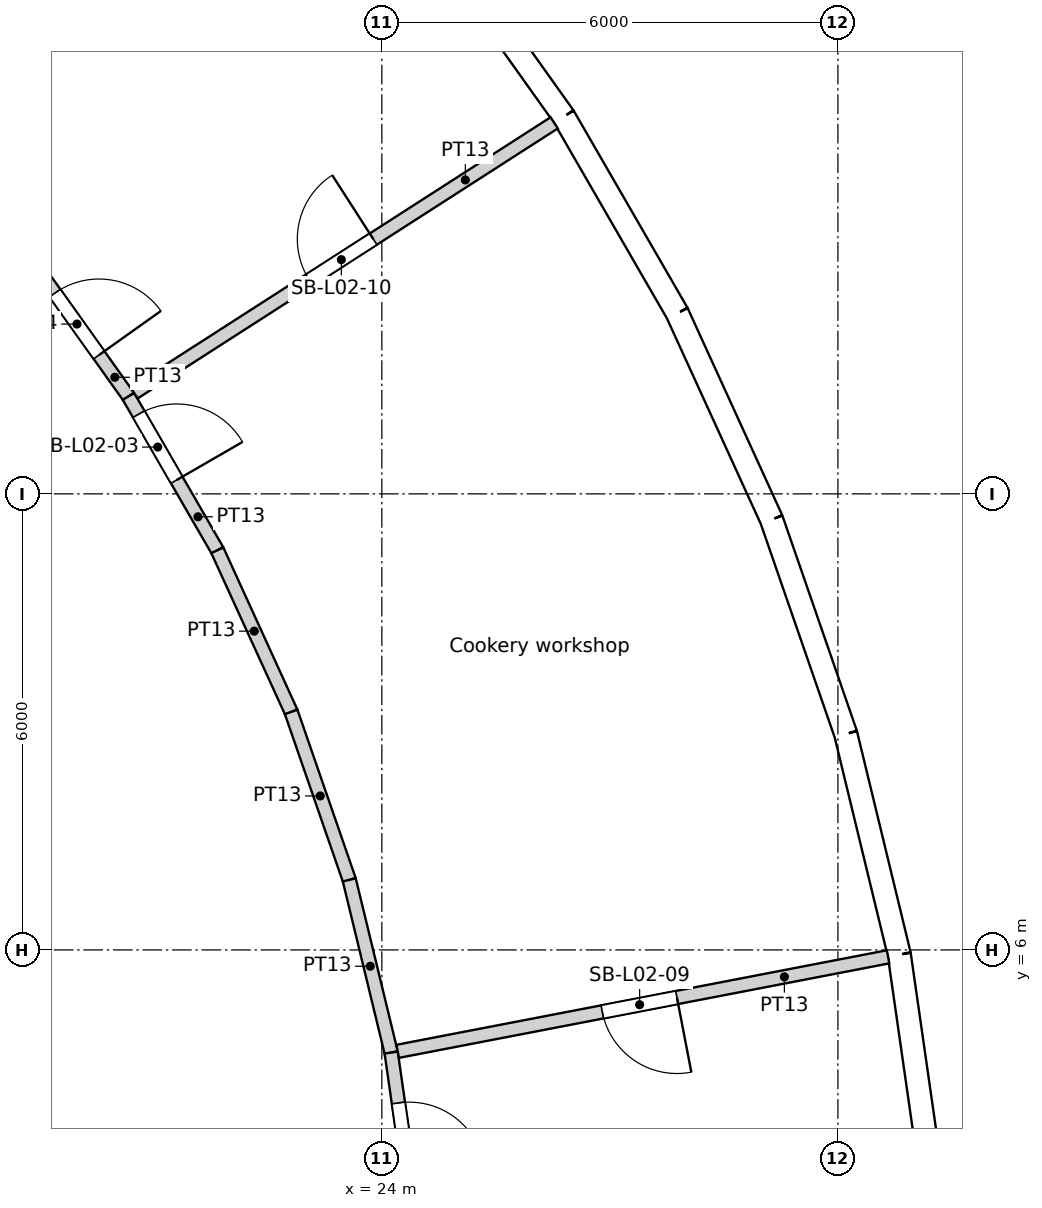
"""IFC4 building model, lengths in metres.
Left out: names, types, materials, properties, quantities, classifications, styles, units other than length and angle.
Written with IfcOpenShell. Run it as: python <this file> out.ifc"""

import sys

from ifc_helpers import new_model, si_unit, direction, frame, frame_2d, origin, origin_2d, place, context, subcontext, project, spatial, rectangle, circle, extrude, element, fill, save


model = new_model("IFC4")
c1 = context("Model", 3, precision=1e-05, world=origin(), true_north=direction((0.0, 1.0)))
c2 = subcontext(c1, "Body", "Model", "MODEL_VIEW")
j1 = project(units=[si_unit("LENGTHUNIT", "METRE"), si_unit("PLANEANGLEUNIT", "RADIAN")], contexts=[c1])
p1 = place(None, origin())
s1 = spatial("IfcSite", under=j1, at=p1, CompositionType="ELEMENT")
p2 = place(p1, origin())
s2 = spatial("IfcBuilding", under=s1, at=p2, CompositionType="ELEMENT")
p3 = place(p2, frame((0.0, 0.0, 13.8)))
s3 = spatial("IfcBuildingStorey", under=s2, at=p3, CompositionType="ELEMENT", Elevation=13.8)
for number, where, z_axis, x_axis in (
    (1, (29.728, 5.729, 0.0), (0.0, 0.0, 1.0), (1.0, 0.0, 0.0)),
    (2, (28.106, 11.252, 0.0), (0.0, 0.0, 1.0), (1.0, 0.0, 0.0)),
    (3, (25.469, 16.368, 0.0), (0.0, 0.0, 1.0), (1.0, 0.0, 0.0)),
):
    element("IfcColumn", number, at=place(p3, frame(where, z_axis=z_axis, x_axis=x_axis)), inside=s3, PredefinedType="COLUMN", context=c2, shape_type="SweptSolid", body=[
        extrude(circle(Radius=0.7, at=origin_2d()), origin(), (0.0, 0.0, 1.0), 4.8),
    ])
for number, where, z_axis, x_axis in (
    (4, (23.886, 5.661, 0.0), (0.0, 0.0, 1.0), (1.0, 0.0, 0.0)),
    (5, (21.937, 11.017, 0.0), (0.0, 0.0, 1.0), (1.0, 0.0, 0.0)),
):
    element("IfcColumn", number, at=place(p3, frame(where, z_axis=z_axis, x_axis=x_axis)), inside=s3, PredefinedType="COLUMN", context=c2, shape_type="SweptSolid", body=[
        extrude(circle(Radius=0.75, at=origin_2d()), origin(), (0.0, 0.0, 1.0), 4.8),
    ])
p4 = place(p3, frame((31.232, 2.982, 0.0), z_axis=(0.0, 0.0, 1.0), x_axis=(-0.142360001917, 0.989814947278, 0.0)))
e6 = element("IfcWall", 6, at=p4, inside=s3, PredefinedType="SOLIDWALL", context=c2, shape_type="SweptSolid", body=[
    extrude(rectangle(XDim=2.986, YDim=0.3, at=frame_2d((1.493, 0.0))), origin(), (0.0, 0.0, 1.0), 4.35),
])
p5 = place(p4, frame((1.493, 0.0, 2.0)))
e7 = element("IfcOpeningElement", 7, at=p5, cuts=e6, PredefinedType="OPENING", context=c2, shape_type="SweptSolid", body=[
    extrude(circle(Radius=1.2, at=origin_2d()), frame((0.0, 0.16, 0.0), z_axis=(0.0, -1.0, 0.0), x_axis=(1.0, 0.0, 0.0)), (0.0, 0.0, 1.0), 0.32),
])
p6 = place(p3, frame((30.807, 5.938, 0.0), z_axis=(0.0, 0.0, 1.0), x_axis=(-0.235756834479, 0.971812078026, 0.0)))
e8 = element("IfcWall", 8, at=p6, inside=s3, PredefinedType="SOLIDWALL", context=c2, shape_type="SweptSolid", body=[
    extrude(rectangle(XDim=2.986, YDim=0.3, at=frame_2d((1.493, 0.0))), origin(), (0.0, 0.0, 1.0), 4.35),
])
p7 = place(p6, frame((1.493, 0.0, 2.0)))
e9 = element("IfcOpeningElement", 9, at=p7, cuts=e8, PredefinedType="OPENING", context=c2, shape_type="SweptSolid", body=[
    extrude(circle(Radius=1.2, at=origin_2d()), frame((0.0, 0.16, 0.0), z_axis=(0.0, -1.0, 0.0), x_axis=(1.0, 0.0, 0.0)), (0.0, 0.0, 1.0), 0.32),
])
p8 = place(p3, frame((30.104, 8.839, 0.0), z_axis=(0.0, 0.0, 1.0), x_axis=(-0.327074054052, 0.944998710669, 0.0)))
e10 = element("IfcWall", 10, at=p8, inside=s3, PredefinedType="SOLIDWALL", context=c2, shape_type="SweptSolid", body=[
    extrude(rectangle(XDim=2.986, YDim=0.3, at=frame_2d((1.493, 0.0))), origin(), (0.0, 0.0, 1.0), 4.35),
])
p9 = place(p8, frame((1.493, 0.0, 2.0)))
e11 = element("IfcOpeningElement", 11, at=p9, cuts=e10, PredefinedType="OPENING", context=c2, shape_type="SweptSolid", body=[
    extrude(circle(Radius=1.2, at=origin_2d()), frame((0.0, 0.16, 0.0), z_axis=(0.0, -1.0, 0.0), x_axis=(1.0, 0.0, 0.0)), (0.0, 0.0, 1.0), 0.32),
])
p10 = place(p3, frame((29.127, 11.661, 0.0), z_axis=(0.0, 0.0, 1.0), x_axis=(-0.415373250944, 0.909651066289, 0.0)))
e12 = element("IfcWall", 12, at=p10, inside=s3, PredefinedType="SOLIDWALL", context=c2, shape_type="SweptSolid", body=[
    extrude(rectangle(XDim=2.986, YDim=0.3, at=frame_2d((1.493, 0.0))), origin(), (0.0, 0.0, 1.0), 4.35),
])
p11 = place(p10, frame((1.493, 0.0, 2.0)))
e13 = element("IfcOpeningElement", 13, at=p11, cuts=e12, PredefinedType="OPENING", context=c2, shape_type="SweptSolid", body=[
    extrude(circle(Radius=1.2, at=origin_2d()), frame((0.0, 0.16, 0.0), z_axis=(0.0, -1.0, 0.0), x_axis=(1.0, 0.0, 0.0)), (0.0, 0.0, 1.0), 0.32),
])
p12 = place(p3, frame((27.887, 14.377, 0.0), z_axis=(0.0, 0.0, 1.0), x_axis=(-0.500017373705, 0.866015372839, 0.0)))
e14 = element("IfcWall", 14, at=p12, inside=s3, PredefinedType="SOLIDWALL", context=c2, shape_type="SweptSolid", body=[
    extrude(rectangle(XDim=2.986, YDim=0.3, at=frame_2d((1.493, 0.0))), origin(), (0.0, 0.0, 1.0), 4.35),
])
p13 = place(p12, frame((1.493, 0.0, 2.0)))
e15 = element("IfcOpeningElement", 15, at=p13, cuts=e14, PredefinedType="OPENING", context=c2, shape_type="SweptSolid", body=[
    extrude(circle(Radius=1.2, at=origin_2d()), frame((0.0, 0.16, 0.0), z_axis=(0.0, -1.0, 0.0), x_axis=(1.0, 0.0, 0.0)), (0.0, 0.0, 1.0), 0.32),
])
p14 = place(p3, frame((26.394, 16.962, 0.0), z_axis=(0.0, 0.0, 1.0), x_axis=(-0.580100533892, 0.814544885551, 0.0)))
e16 = element("IfcWall", 16, at=p14, inside=s3, PredefinedType="SOLIDWALL", context=c2, shape_type="SweptSolid", body=[
    extrude(rectangle(XDim=2.986, YDim=0.3, at=frame_2d((1.493, 0.0))), origin(), (0.0, 0.0, 1.0), 4.35),
])
p15 = place(p14, frame((1.493, 0.0, 2.0)))
e17 = element("IfcOpeningElement", 17, at=p15, cuts=e16, PredefinedType="OPENING", context=c2, shape_type="SweptSolid", body=[
    extrude(circle(Radius=1.2, at=origin_2d()), frame((0.0, 0.16, 0.0), z_axis=(0.0, -1.0, 0.0), x_axis=(1.0, 0.0, 0.0)), (0.0, 0.0, 1.0), 0.32),
])
p16 = place(p3, frame((19.311, 15.186, 0.0), z_axis=(0.0, 0.0, 1.0), x_axis=(0.580032319147, -0.814593462252, 0.0)))
e18 = element("IfcWall", 18, at=p16, inside=s3, PredefinedType="PARTITIONING", context=c2, shape_type="SweptSolid", body=[
    extrude(rectangle(XDim=2.338, YDim=0.175, at=frame_2d((1.169, 0.0))), origin(), (0.0, 0.0, 1.0), 3.75),
])
p17 = place(p16, frame((0.669, 0.0, 0.0)))
e19 = element("IfcOpeningElement", 19, at=p17, cuts=e18, PredefinedType="OPENING", context=c2, shape_type="SweptSolid", body=[
    extrude(rectangle(XDim=1.0, YDim=2.1, at=frame_2d((0.5, 1.05))), frame((0.0, 0.087, 0.0), z_axis=(0.0, -1.0, 0.0), x_axis=(1.0, 0.0, 0.0)), (0.0, 0.0, 1.0), 0.175),
])
p18 = place(p3, frame((20.667, 13.282, 0.0), z_axis=(0.0, 0.0, 1.0), x_axis=(0.500002679963, -0.866023856502, 0.0)))
e20 = element("IfcWall", 20, at=p18, inside=s3, PredefinedType="PARTITIONING", context=c2, shape_type="SweptSolid", body=[
    extrude(rectangle(XDim=2.338, YDim=0.175, at=frame_2d((1.169, 0.0))), origin(), (0.0, 0.0, 1.0), 3.75),
])
p19 = place(p18, frame((0.269, 0.0, 0.0)))
e21 = element("IfcOpeningElement", 21, at=p19, cuts=e20, PredefinedType="OPENING", context=c2, shape_type="SweptSolid", body=[
    extrude(rectangle(XDim=1.0, YDim=2.1, at=frame_2d((0.5, 1.05))), frame((0.0, 0.087, 0.0), z_axis=(0.0, -1.0, 0.0), x_axis=(1.0, 0.0, 0.0)), (0.0, 0.0, 1.0), 0.175),
])
p20 = place(p3, frame((17.717, 16.893, 0.0), z_axis=(0.0, 0.0, 1.0), x_axis=(0.723737544967, 0.690075333573, 0.0)))
e22 = element("IfcWall", 22, at=p20, inside=s3, PredefinedType="PARTITIONING", context=c2, shape_type="SweptSolid", body=[
    extrude(rectangle(XDim=6.745, YDim=0.175, at=frame_2d((3.373, 0.0))), origin(), (0.0, 0.0, 1.0), 3.75),
])
p21 = place(p20, frame((3.592, 0.0, 0.0)))
e23 = element("IfcOpeningElement", 23, at=p21, cuts=e22, PredefinedType="OPENING", context=c2, shape_type="SweptSolid", body=[
    extrude(rectangle(XDim=1.0, YDim=2.1, at=frame_2d((0.5, 1.05))), frame((0.0, 0.087, 0.0), z_axis=(0.0, -1.0, 0.0), x_axis=(1.0, 0.0, 0.0)), (0.0, 0.0, 1.0), 0.175),
])
p22 = place(p3, frame((22.807, 9.131, 0.0), z_axis=(0.0, 0.0, 1.0), x_axis=(-0.415438886862, 0.909621092149, 0.0)))
e24 = element("IfcWall", 24, at=p22, inside=s3, PredefinedType="PARTITIONING", context=c2, shape_type="SweptSolid", body=[
    extrude(rectangle(XDim=2.338, YDim=0.175, at=frame_2d((1.169, 0.0))), origin(), (0.0, 0.0, 1.0), 3.75),
])
p23 = place(p3, frame((23.572, 6.921, 0.0), z_axis=(0.0, 0.0, 1.0), x_axis=(-0.327046007052, 0.945008417566, 0.0)))
e25 = element("IfcWall", 25, at=p23, inside=s3, PredefinedType="PARTITIONING", context=c2, shape_type="SweptSolid", body=[
    extrude(rectangle(XDim=2.338, YDim=0.175, at=frame_2d((1.169, 0.0))), origin(), (0.0, 0.0, 1.0), 3.75),
])
p24 = place(p3, frame((24.123, 4.649, 0.0), z_axis=(0.0, 0.0, 1.0), x_axis=(-0.235821214509, 0.971796457489, 0.0)))
e26 = element("IfcWall", 26, at=p24, inside=s3, PredefinedType="PARTITIONING", context=c2, shape_type="SweptSolid", body=[
    extrude(rectangle(XDim=2.338, YDim=0.175, at=frame_2d((1.169, 0.0))), origin(), (0.0, 0.0, 1.0), 3.75),
])
p25 = place(p3, frame((24.123, 4.649, 0.0), z_axis=(0.0, 0.0, 1.0), x_axis=(0.142327683086, -0.989819594991, 0.0)))
e27 = element("IfcWall", 27, at=p25, inside=s3, PredefinedType="PARTITIONING", context=c2, shape_type="SweptSolid", body=[
    extrude(rectangle(XDim=2.338, YDim=0.175, at=frame_2d((1.169, 0.0))), origin(), (0.0, 0.0, 1.0), 3.75),
])
p26 = place(p25, frame((0.669, 0.0, 0.0)))
e28 = element("IfcOpeningElement", 28, at=p26, cuts=e27, PredefinedType="OPENING", context=c2, shape_type="SweptSolid", body=[
    extrude(rectangle(XDim=1.0, YDim=2.1, at=frame_2d((0.5, 1.05))), frame((0.0, 0.087, 0.0), z_axis=(0.0, -1.0, 0.0), x_axis=(1.0, 0.0, 0.0)), (0.0, 0.0, 1.0), 0.175),
])
p27 = place(p3, frame((20.74, 13.329, 0.0), z_axis=(0.0, 0.0, 1.0), x_axis=(0.841256944445, 0.540635508844, 0.0)))
e29 = element("IfcWall", 29, at=p27, inside=s3, PredefinedType="PARTITIONING", context=c2, shape_type="SweptSolid", body=[
    extrude(rectangle(XDim=6.57, YDim=0.175, at=frame_2d((3.285, 0.0))), origin(), (0.0, 0.0, 1.0), 3.75),
])
p28 = place(p27, frame((2.741, 0.0, 0.0)))
e30 = element("IfcOpeningElement", 30, at=p28, cuts=e29, PredefinedType="OPENING", context=c2, shape_type="SweptSolid", body=[
    extrude(rectangle(XDim=1.0, YDim=2.1, at=frame_2d((0.5, 1.05))), frame((0.0, 0.087, 0.0), z_axis=(0.0, -1.0, 0.0), x_axis=(1.0, 0.0, 0.0)), (0.0, 0.0, 1.0), 0.175),
])
p29 = place(p3, frame((30.66, 5.909, 0.0), z_axis=(0.0, 0.0, 1.0), x_axis=(-0.981934280486, -0.189222273548, 0.0)))
e31 = element("IfcWall", 31, at=p29, inside=s3, PredefinedType="PARTITIONING", context=c2, shape_type="SweptSolid", body=[
    extrude(rectangle(XDim=6.57, YDim=0.175, at=frame_2d((3.285, 0.0))), origin(), (0.0, 0.0, 1.0), 3.75),
])
p30 = place(p29, frame((2.829, 0.0, 0.0)))
e32 = element("IfcOpeningElement", 32, at=p30, cuts=e31, PredefinedType="OPENING", context=c2, shape_type="SweptSolid", body=[
    extrude(rectangle(XDim=1.0, YDim=2.1, at=frame_2d((0.5, 1.05))), frame((0.0, 0.087, 0.0), z_axis=(0.0, -1.0, 0.0), x_axis=(1.0, 0.0, 0.0)), (0.0, 0.0, 1.0), 0.175),
])
p31 = place(p5, origin())
e33 = element("IfcWindow", 33, at=p31, inside=s3, PartitioningType="SINGLE_PANEL", PredefinedType="WINDOW", context=c2, shape_type="SweptSolid", body=[
    extrude(circle(Radius=1.2, at=origin_2d()), frame((0.0, 0.12, 0.0), z_axis=(0.0, -1.0, 0.0), x_axis=(1.0, 0.0, 0.0)), (0.0, 0.0, 1.0), 0.1),
])
fill(e7, e33)
p32 = place(p7, origin())
e34 = element("IfcWindow", 34, at=p32, inside=s3, PartitioningType="SINGLE_PANEL", PredefinedType="WINDOW", context=c2, shape_type="SweptSolid", body=[
    extrude(circle(Radius=1.2, at=origin_2d()), frame((0.0, 0.12, 0.0), z_axis=(0.0, -1.0, 0.0), x_axis=(1.0, 0.0, 0.0)), (0.0, 0.0, 1.0), 0.1),
])
fill(e9, e34)
p33 = place(p9, origin())
e35 = element("IfcWindow", 35, at=p33, inside=s3, PartitioningType="SINGLE_PANEL", PredefinedType="WINDOW", context=c2, shape_type="SweptSolid", body=[
    extrude(circle(Radius=1.2, at=origin_2d()), frame((0.0, 0.12, 0.0), z_axis=(0.0, -1.0, 0.0), x_axis=(1.0, 0.0, 0.0)), (0.0, 0.0, 1.0), 0.1),
])
fill(e11, e35)
p34 = place(p11, origin())
e36 = element("IfcWindow", 36, at=p34, inside=s3, PartitioningType="SINGLE_PANEL", PredefinedType="WINDOW", context=c2, shape_type="SweptSolid", body=[
    extrude(circle(Radius=1.2, at=origin_2d()), frame((0.0, 0.12, 0.0), z_axis=(0.0, -1.0, 0.0), x_axis=(1.0, 0.0, 0.0)), (0.0, 0.0, 1.0), 0.1),
])
fill(e13, e36)
p35 = place(p13, origin())
e37 = element("IfcWindow", 37, at=p35, inside=s3, PartitioningType="SINGLE_PANEL", PredefinedType="WINDOW", context=c2, shape_type="SweptSolid", body=[
    extrude(circle(Radius=1.2, at=origin_2d()), frame((0.0, 0.12, 0.0), z_axis=(0.0, -1.0, 0.0), x_axis=(1.0, 0.0, 0.0)), (0.0, 0.0, 1.0), 0.1),
])
fill(e15, e37)
p36 = place(p15, origin())
e38 = element("IfcWindow", 38, at=p36, inside=s3, PartitioningType="SINGLE_PANEL", PredefinedType="WINDOW", context=c2, shape_type="SweptSolid", body=[
    extrude(circle(Radius=1.2, at=origin_2d()), frame((0.0, 0.12, 0.0), z_axis=(0.0, -1.0, 0.0), x_axis=(1.0, 0.0, 0.0)), (0.0, 0.0, 1.0), 0.1),
])
fill(e17, e38)
p37 = place(p26, origin())
e39 = element("IfcDoor", 39, at=p37, inside=s3, OperationType="SINGLE_SWING_RIGHT", PredefinedType="DOOR", context=c2, shape_type="SweptSolid", body=[
    extrude(rectangle(XDim=1.0, YDim=2.1, at=frame_2d((0.5, 1.05))), frame((0.0, 0.025, 0.0), z_axis=(0.0, -1.0, 0.0), x_axis=(1.0, 0.0, 0.0)), (0.0, 0.0, 1.0), 0.05),
])
fill(e28, e39)
p38 = place(p19, origin())
e40 = element("IfcDoor", 40, at=p38, inside=s3, OperationType="SINGLE_SWING_RIGHT", PredefinedType="DOOR", context=c2, shape_type="SweptSolid", body=[
    extrude(rectangle(XDim=1.0, YDim=2.1, at=frame_2d((0.5, 1.05))), frame((0.0, 0.025, 0.0), z_axis=(0.0, -1.0, 0.0), x_axis=(1.0, 0.0, 0.0)), (0.0, 0.0, 1.0), 0.05),
])
fill(e21, e40)
p39 = place(p17, origin())
e41 = element("IfcDoor", 41, at=p39, inside=s3, OperationType="SINGLE_SWING_RIGHT", PredefinedType="DOOR", context=c2, shape_type="SweptSolid", body=[
    extrude(rectangle(XDim=1.0, YDim=2.1, at=frame_2d((0.5, 1.05))), frame((0.0, 0.025, 0.0), z_axis=(0.0, -1.0, 0.0), x_axis=(1.0, 0.0, 0.0)), (0.0, 0.0, 1.0), 0.05),
])
fill(e19, e41)
p40 = place(p30, origin())
e42 = element("IfcDoor", 42, at=p40, inside=s3, OperationType="SINGLE_SWING_LEFT", PredefinedType="DOOR", context=c2, shape_type="SweptSolid", body=[
    extrude(rectangle(XDim=1.0, YDim=2.1, at=frame_2d((0.5, 1.05))), frame((0.0, 0.025, 0.0), z_axis=(0.0, -1.0, 0.0), x_axis=(1.0, 0.0, 0.0)), (0.0, 0.0, 1.0), 0.05),
])
fill(e32, e42)
p41 = place(p28, origin())
e43 = element("IfcDoor", 43, at=p41, inside=s3, OperationType="SINGLE_SWING_RIGHT", PredefinedType="DOOR", context=c2, shape_type="SweptSolid", body=[
    extrude(rectangle(XDim=1.0, YDim=2.1, at=frame_2d((0.5, 1.05))), frame((0.0, 0.025, 0.0), z_axis=(0.0, -1.0, 0.0), x_axis=(1.0, 0.0, 0.0)), (0.0, 0.0, 1.0), 0.05),
])
fill(e30, e43)
save(model, sys.argv[1])
